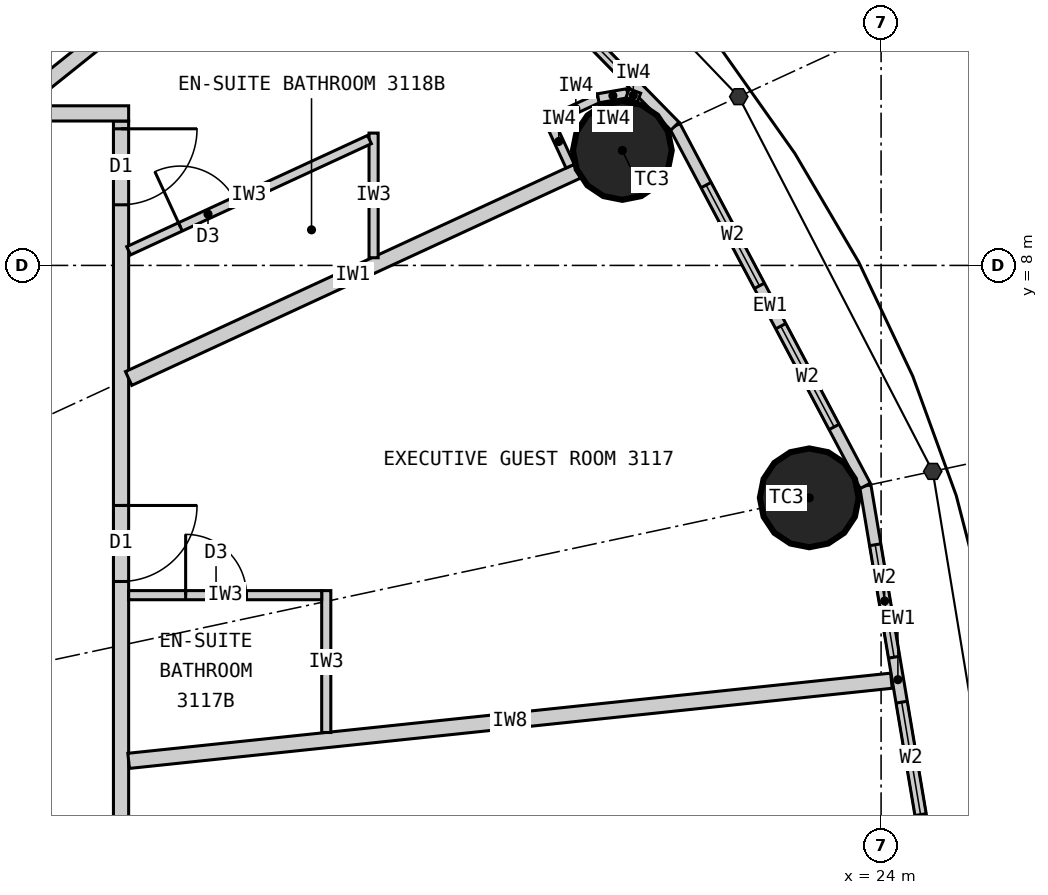
"""IFC4 building model, lengths in metres.
Left out: names, types, materials, properties, quantities, classifications, styles, units other than length and angle.
Written with IfcOpenShell. Run it as: python <this file> out.ifc"""

import sys

from ifc_helpers import new_model, si_unit, direction, frame, frame_2d, origin, origin_2d, place, context, subcontext, project, spatial, rectangle, circle, extrude, element, fill, save


model = new_model("IFC4")
c1 = context("Model", 3, precision=1e-05, world=origin(), true_north=direction((0.0, 1.0)))
c2 = subcontext(c1, "Body", "Model", "MODEL_VIEW")
j1 = project(units=[si_unit("LENGTHUNIT", "METRE"), si_unit("PLANEANGLEUNIT", "RADIAN")], contexts=[c1])
p1 = place(None, origin())
s1 = spatial("IfcSite", under=j1, at=p1, CompositionType="ELEMENT")
p2 = place(p1, origin())
s2 = spatial("IfcBuilding", under=s1, at=p2, CompositionType="ELEMENT")
p3 = place(p2, frame((0.0, 0.0, 122.1)))
s3 = spatial("IfcBuildingStorey", under=s2, at=p3, CompositionType="ELEMENT", Elevation=122.1)
for number, where, z_axis, x_axis in (
    (1, (23.055, 4.942, 0.0), (0.0, 0.0, 1.0), (1.0, 0.0, 0.0)),
    (2, (20.596, 9.513, 0.0), (0.0, 0.0, 1.0), (1.0, 0.0, 0.0)),
):
    element("IfcColumn", number, at=place(p3, frame(where, z_axis=z_axis, x_axis=x_axis)), inside=s3, PredefinedType="COLUMN", context=c2, shape_type="SweptSolid", body=[
        extrude(circle(Radius=0.65, at=origin_2d()), origin(), (0.0, 0.0, 1.0), 3.3),
    ])
p4 = place(p3, frame((24.65, 0.0, 0.0), z_axis=(0.0, 0.0, 1.0), x_axis=(-0.165883894218, 0.986145290329, 0.0)))
e3 = element("IfcWall", 3, at=p4, inside=s3, PredefinedType="ELEMENTEDWALL", context=c2, shape_type="SweptSolid", body=[
    extrude(rectangle(XDim=5.172, YDim=0.15, at=frame_2d((2.586, 0.0))), origin(), (0.0, 0.0, 1.0), 3.12),
])
p5 = place(p4, frame((0.786, 0.0, 0.9)))
e4 = element("IfcOpeningElement", 4, at=p5, cuts=e3, PredefinedType="OPENING", context=c2, shape_type="SweptSolid", body=[
    extrude(rectangle(XDim=1.5, YDim=1.9, at=frame_2d((0.75, 0.95))), frame((0.0, 0.085, 0.0), z_axis=(0.0, -1.0, 0.0), x_axis=(1.0, 0.0, 0.0)), (0.0, 0.0, 1.0), 0.17),
])
p6 = place(p4, frame((2.886, 0.0, 0.9)))
e5 = element("IfcOpeningElement", 5, at=p6, cuts=e3, PredefinedType="OPENING", context=c2, shape_type="SweptSolid", body=[
    extrude(rectangle(XDim=1.5, YDim=1.9, at=frame_2d((0.75, 0.95))), frame((0.0, 0.085, 0.0), z_axis=(0.0, -1.0, 0.0), x_axis=(1.0, 0.0, 0.0)), (0.0, 0.0, 1.0), 0.17),
])
p7 = place(p3, frame((23.792, 5.1, 0.0), z_axis=(0.0, 0.0, 1.0), x_axis=(-0.467814388454, 0.883826735257, 0.0)))
e6 = element("IfcWall", 6, at=p7, inside=s3, PredefinedType="ELEMENTEDWALL", context=c2, shape_type="SweptSolid", body=[
    extrude(rectangle(XDim=5.354, YDim=0.15, at=frame_2d((2.677, 0.0))), origin(), (0.0, 0.0, 1.0), 3.12),
])
p8 = place(p7, frame((0.877, 0.0, 0.9)))
e7 = element("IfcOpeningElement", 7, at=p8, cuts=e6, PredefinedType="OPENING", context=c2, shape_type="SweptSolid", body=[
    extrude(rectangle(XDim=1.5, YDim=1.9, at=frame_2d((0.75, 0.95))), frame((0.0, 0.085, 0.0), z_axis=(0.0, -1.0, 0.0), x_axis=(1.0, 0.0, 0.0)), (0.0, 0.0, 1.0), 0.17),
])
p9 = place(p7, frame((2.977, 0.0, 0.9)))
e8 = element("IfcOpeningElement", 8, at=p9, cuts=e6, PredefinedType="OPENING", context=c2, shape_type="SweptSolid", body=[
    extrude(rectangle(XDim=1.5, YDim=1.9, at=frame_2d((0.75, 0.95))), frame((0.0, 0.085, 0.0), z_axis=(0.0, -1.0, 0.0), x_axis=(1.0, 0.0, 0.0)), (0.0, 0.0, 1.0), 0.17),
])
p10 = place(p3, frame((21.287, 9.832, 0.0), z_axis=(0.0, 0.0, 1.0), x_axis=(-0.700136650834, 0.714008872605, 0.0)))
e9 = element("IfcWall", 9, at=p10, inside=s3, PredefinedType="ELEMENTEDWALL", context=c2, shape_type="SweptSolid", body=[
    extrude(rectangle(XDim=5.649, YDim=0.15, at=frame_2d((2.825, 0.0))), origin(), (0.0, 0.0, 1.0), 3.12),
])
p11 = place(p10, frame((1.025, 0.0, 0.9)))
e10 = element("IfcOpeningElement", 10, at=p11, cuts=e9, PredefinedType="OPENING", context=c2, shape_type="SweptSolid", body=[
    extrude(rectangle(XDim=1.5, YDim=1.9, at=frame_2d((0.75, 0.95))), frame((0.0, 0.085, 0.0), z_axis=(0.0, -1.0, 0.0), x_axis=(1.0, 0.0, 0.0)), (0.0, 0.0, 1.0), 0.17),
])
p12 = place(p10, frame((3.125, 0.0, 0.9)))
e11 = element("IfcOpeningElement", 11, at=p12, cuts=e9, PredefinedType="OPENING", context=c2, shape_type="SweptSolid", body=[
    extrude(rectangle(XDim=1.5, YDim=1.9, at=frame_2d((0.75, 0.95))), frame((0.0, 0.085, 0.0), z_axis=(0.0, -1.0, 0.0), x_axis=(1.0, 0.0, 0.0)), (0.0, 0.0, 1.0), 0.17),
])
p13 = place(p3, frame((14.0, -9.9, 0.0), z_axis=(0.0, 0.0, 1.0), x_axis=(0.0, 1.0, 0.0)))
e12 = element("IfcWall", 12, at=p13, inside=s3, PredefinedType="PARTITIONING", context=c2, shape_type="SweptSolid", body=[
    extrude(rectangle(XDim=19.8, YDim=0.2, at=frame_2d((9.9, 0.0))), origin(), (0.0, 0.0, 1.0), 3.12),
])
p14 = place(p13, frame((2.478, 0.0, 0.0)))
e13 = element("IfcOpeningElement", 13, at=p14, cuts=e12, PredefinedType="OPENING", context=c2, shape_type="SweptSolid", body=[
    extrude(rectangle(XDim=1.0, YDim=2.2, at=frame_2d((0.5, 1.1))), frame((0.0, 0.11, 0.0), z_axis=(0.0, -1.0, 0.0), x_axis=(1.0, 0.0, 0.0)), (0.0, 0.0, 1.0), 0.22),
])
p15 = place(p13, frame((8.838, 0.0, 0.0)))
e14 = element("IfcOpeningElement", 14, at=p15, cuts=e12, PredefinedType="OPENING", context=c2, shape_type="SweptSolid", body=[
    extrude(rectangle(XDim=1.0, YDim=2.2, at=frame_2d((0.5, 1.1))), frame((0.0, 0.11, 0.0), z_axis=(0.0, -1.0, 0.0), x_axis=(1.0, 0.0, 0.0)), (0.0, 0.0, 1.0), 0.22),
])
p16 = place(p13, frame((13.742, 0.0, 0.0)))
e15 = element("IfcOpeningElement", 15, at=p16, cuts=e12, PredefinedType="OPENING", context=c2, shape_type="SweptSolid", body=[
    extrude(rectangle(XDim=1.0, YDim=2.2, at=frame_2d((0.5, 1.1))), frame((0.0, 0.11, 0.0), z_axis=(0.0, -1.0, 0.0), x_axis=(1.0, 0.0, 0.0)), (0.0, 0.0, 1.0), 0.22),
])
p17 = place(p13, frame((18.698, 0.0, 0.0)))
e16 = element("IfcOpeningElement", 16, at=p17, cuts=e12, PredefinedType="OPENING", context=c2, shape_type="SweptSolid", body=[
    extrude(rectangle(XDim=1.0, YDim=2.2, at=frame_2d((0.5, 1.1))), frame((0.0, 0.11, 0.0), z_axis=(0.0, -1.0, 0.0), x_axis=(1.0, 0.0, 0.0)), (0.0, 0.0, 1.0), 0.22),
])
p18 = place(p3, frame((3.283, 10.0, 0.0), z_axis=(0.0, 0.0, 1.0), x_axis=(1.0, 0.0, 0.0)))
e17 = element("IfcWall", 17, at=p18, inside=s3, PredefinedType="PARTITIONING", context=c2, shape_type="SweptSolid", body=[
    extrude(rectangle(XDim=10.817, YDim=0.2, at=frame_2d((5.409, 0.0))), origin(), (0.0, 0.0, 1.0), 3.12),
])
p19 = place(p18, frame((6.482, 0.0, 0.0)))
e18 = element("IfcOpeningElement", 18, at=p19, cuts=e17, PredefinedType="OPENING", context=c2, shape_type="SweptSolid", body=[
    extrude(rectangle(XDim=1.0, YDim=2.2, at=frame_2d((0.5, 1.1))), frame((0.0, 0.11, 0.0), z_axis=(0.0, -1.0, 0.0), x_axis=(1.0, 0.0, 0.0)), (0.0, 0.0, 1.0), 0.22),
])
p20 = place(p3, frame((14.1, 1.482, 0.0), z_axis=(0.0, 0.0, 1.0), x_axis=(0.994523202615, 0.104516024894, 0.0)))
e19 = element("IfcWall", 19, at=p20, inside=s3, PredefinedType="PARTITIONING", context=c2, shape_type="SweptSolid", body=[
    extrude(rectangle(XDim=10.091, YDim=0.2, at=frame_2d((5.045, 0.0))), origin(), (0.0, 0.0, 1.0), 2.47),
])
p21 = place(p3, frame((14.1, 6.512, 0.0), z_axis=(0.0, 0.0, 1.0), x_axis=(0.907833019998, 0.419331858797, 0.0)))
e20 = element("IfcWall", 20, at=p21, inside=s3, PredefinedType="PARTITIONING", context=c2, shape_type="SweptSolid", body=[
    extrude(rectangle(XDim=6.505, YDim=0.2, at=frame_2d((3.252, 0.0))), origin(), (0.0, 0.0, 1.0), 2.27),
])
p22 = place(p3, frame((12.625, 10.1, 0.0), z_axis=(0.0, 0.0, 1.0), x_axis=(0.780863644897, 0.624701503182, 0.0)))
e21 = element("IfcWall", 21, at=p22, inside=s3, PredefinedType="PARTITIONING", context=c2, shape_type="SweptSolid", body=[
    extrude(rectangle(XDim=4.612, YDim=0.2, at=frame_2d((2.306, 0.0))), origin(), (0.0, 0.0, 1.0), 2.37),
])
p23 = place(p3, frame((16.7, 1.855, 0.0), z_axis=(0.0, 0.0, 1.0), x_axis=(0.0, 1.0, 0.0)))
e22 = element("IfcWall", 22, at=p23, inside=s3, PredefinedType="PARTITIONING", context=c2, shape_type="SweptSolid", body=[
    extrude(rectangle(XDim=1.867, YDim=0.12, at=frame_2d((0.933, 0.0))), origin(), (0.0, 0.0, 1.0), 3.12),
])
p24 = place(p3, frame((14.1, 3.662, 0.0), z_axis=(0.0, 0.0, 1.0), x_axis=(1.0, 0.0, 0.0)))
e23 = element("IfcWall", 23, at=p24, inside=s3, PredefinedType="PARTITIONING", context=c2, shape_type="SweptSolid", body=[
    extrude(rectangle(XDim=2.54, YDim=0.12, at=frame_2d((1.27, 0.0))), origin(), (0.0, 0.0, 1.0), 2.37),
])
p25 = place(p24, frame((0.75, 0.0, 0.0)))
e24 = element("IfcOpeningElement", 24, at=p25, cuts=e23, PredefinedType="OPENING", context=c2, shape_type="SweptSolid", body=[
    extrude(rectangle(XDim=0.8, YDim=2.1, at=frame_2d((0.4, 1.05))), frame((0.0, 0.07, 0.0), z_axis=(0.0, -1.0, 0.0), x_axis=(1.0, 0.0, 0.0)), (0.0, 0.0, 1.0), 0.14),
])
p26 = place(p3, frame((17.323, 8.101, 0.0), z_axis=(0.0, 0.0, 1.0), x_axis=(0.0, 1.0, 0.0)))
e25 = element("IfcWall", 25, at=p26, inside=s3, PredefinedType="PARTITIONING", context=c2, shape_type="SweptSolid", body=[
    extrude(rectangle(XDim=1.64, YDim=0.12, at=frame_2d((0.82, 0.0))), origin(), (0.0, 0.0, 1.0), 3.12),
])
p27 = place(p3, frame((14.1, 8.193, 0.0), z_axis=(0.0, 0.0, 1.0), x_axis=(0.907836493557, 0.419324338628, 0.0)))
e26 = element("IfcWall", 26, at=p27, inside=s3, PredefinedType="PARTITIONING", context=c2, shape_type="SweptSolid", body=[
    extrude(rectangle(XDim=3.49, YDim=0.12, at=frame_2d((1.745, 0.0))), origin(), (0.0, 0.0, 1.0), 3.12),
])
p28 = place(p27, frame((0.75, 0.0, 0.0)))
e27 = element("IfcOpeningElement", 27, at=p28, cuts=e26, PredefinedType="OPENING", context=c2, shape_type="SweptSolid", body=[
    extrude(rectangle(XDim=0.8, YDim=2.1, at=frame_2d((0.4, 1.05))), frame((0.0, 0.07, 0.0), z_axis=(0.0, -1.0, 0.0), x_axis=(1.0, 0.0, 0.0)), (0.0, 0.0, 1.0), 0.14),
])
p29 = place(p3, frame((19.909, 9.306, 0.0), z_axis=(0.0, 0.0, 1.0), x_axis=(-0.419296148934, 0.90784951368, 0.0)))
e28 = element("IfcWall", 28, at=p29, inside=s3, PredefinedType="PARTITIONING", context=c2, shape_type="SweptSolid", body=[
    extrude(rectangle(XDim=0.716, YDim=0.12, at=frame_2d((0.358, 0.0))), origin(), (0.0, 0.0, 1.0), 3.12),
])
p30 = place(p3, frame((19.689, 9.926, 0.0), z_axis=(0.0, 0.0, 1.0), x_axis=(0.907893409272, 0.419201094227, 0.0)))
e29 = element("IfcWall", 29, at=p30, inside=s3, PredefinedType="PARTITIONING", context=c2, shape_type="SweptSolid", body=[
    extrude(rectangle(XDim=0.65, YDim=0.12, at=frame_2d((0.325, 0.0))), origin(), (0.0, 0.0, 1.0), 3.12),
])
p31 = place(p3, frame((20.279, 10.199, 0.0), z_axis=(0.0, 0.0, 1.0), x_axis=(0.985380740712, 0.170366651181, 0.0)))
e30 = element("IfcWall", 30, at=p31, inside=s3, PredefinedType="PARTITIONING", context=c2, shape_type="SweptSolid", body=[
    extrude(rectangle(XDim=0.391, YDim=0.12, at=frame_2d((0.196, 0.0))), origin(), (0.0, 0.0, 1.0), 3.12),
])
p32 = place(p3, frame((20.664, 10.265, 0.0), z_axis=(0.0, 0.0, 1.0), x_axis=(0.938058651481, -0.346476501918, 0.0)))
e31 = element("IfcWall", 31, at=p32, inside=s3, PredefinedType="PARTITIONING", context=c2, shape_type="SweptSolid", body=[
    extrude(rectangle(XDim=0.161, YDim=0.12, at=frame_2d((0.081, 0.0))), origin(), (0.0, 0.0, 1.0), 3.12),
])
p33 = place(p5, origin())
e32 = element("IfcWindow", 32, at=p33, inside=s3, PartitioningType="SINGLE_PANEL", PredefinedType="WINDOW", context=c2, shape_type="SweptSolid", body=[
    extrude(rectangle(XDim=1.5, YDim=1.9, at=frame_2d((0.75, 0.95))), frame((0.0, 0.03, 0.0), z_axis=(0.0, -1.0, 0.0), x_axis=(1.0, 0.0, 0.0)), (0.0, 0.0, 1.0), 0.06),
])
fill(e4, e32)
p34 = place(p6, origin())
e33 = element("IfcWindow", 33, at=p34, inside=s3, PartitioningType="SINGLE_PANEL", PredefinedType="WINDOW", context=c2, shape_type="SweptSolid", body=[
    extrude(rectangle(XDim=1.5, YDim=1.9, at=frame_2d((0.75, 0.95))), frame((0.0, 0.03, 0.0), z_axis=(0.0, -1.0, 0.0), x_axis=(1.0, 0.0, 0.0)), (0.0, 0.0, 1.0), 0.06),
])
fill(e5, e33)
p35 = place(p8, origin())
e34 = element("IfcWindow", 34, at=p35, inside=s3, PartitioningType="SINGLE_PANEL", PredefinedType="WINDOW", context=c2, shape_type="SweptSolid", body=[
    extrude(rectangle(XDim=1.5, YDim=1.9, at=frame_2d((0.75, 0.95))), frame((0.0, 0.03, 0.0), z_axis=(0.0, -1.0, 0.0), x_axis=(1.0, 0.0, 0.0)), (0.0, 0.0, 1.0), 0.06),
])
fill(e7, e34)
p36 = place(p9, origin())
e35 = element("IfcWindow", 35, at=p36, inside=s3, PartitioningType="SINGLE_PANEL", PredefinedType="WINDOW", context=c2, shape_type="SweptSolid", body=[
    extrude(rectangle(XDim=1.5, YDim=1.9, at=frame_2d((0.75, 0.95))), frame((0.0, 0.03, 0.0), z_axis=(0.0, -1.0, 0.0), x_axis=(1.0, 0.0, 0.0)), (0.0, 0.0, 1.0), 0.06),
])
fill(e8, e35)
p37 = place(p11, origin())
e36 = element("IfcWindow", 36, at=p37, inside=s3, PartitioningType="SINGLE_PANEL", PredefinedType="WINDOW", context=c2, shape_type="SweptSolid", body=[
    extrude(rectangle(XDim=1.5, YDim=1.9, at=frame_2d((0.75, 0.95))), frame((0.0, 0.03, 0.0), z_axis=(0.0, -1.0, 0.0), x_axis=(1.0, 0.0, 0.0)), (0.0, 0.0, 1.0), 0.06),
])
fill(e10, e36)
p38 = place(p25, origin())
e37 = element("IfcDoor", 37, at=p38, inside=s3, OperationType="SINGLE_SWING_LEFT", PredefinedType="DOOR", context=c2, shape_type="SweptSolid", body=[
    extrude(rectangle(XDim=0.8, YDim=2.1, at=frame_2d((0.4, 1.05))), frame((0.0, 0.025, 0.0), z_axis=(0.0, -1.0, 0.0), x_axis=(1.0, 0.0, 0.0)), (0.0, 0.0, 1.0), 0.05),
])
fill(e24, e37)
p39 = place(p16, origin())
e38 = element("IfcDoor", 38, at=p39, inside=s3, OperationType="SINGLE_SWING_RIGHT", PredefinedType="DOOR", context=c2, shape_type="SweptSolid", body=[
    extrude(rectangle(XDim=1.0, YDim=2.2, at=frame_2d((0.5, 1.1))), frame((0.0, 0.025, 0.0), z_axis=(0.0, -1.0, 0.0), x_axis=(1.0, 0.0, 0.0)), (0.0, 0.0, 1.0), 0.05),
])
fill(e15, e38)
p40 = place(p28, origin())
e39 = element("IfcDoor", 39, at=p40, inside=s3, OperationType="SINGLE_SWING_LEFT", PredefinedType="DOOR", context=c2, shape_type="SweptSolid", body=[
    extrude(rectangle(XDim=0.8, YDim=2.1, at=frame_2d((0.4, 1.05))), frame((0.0, 0.025, 0.0), z_axis=(0.0, -1.0, 0.0), x_axis=(1.0, 0.0, 0.0)), (0.0, 0.0, 1.0), 0.05),
])
fill(e27, e39)
p41 = place(p17, origin())
e40 = element("IfcDoor", 40, at=p41, inside=s3, OperationType="SINGLE_SWING_RIGHT", PredefinedType="DOOR", context=c2, shape_type="SweptSolid", body=[
    extrude(rectangle(XDim=1.0, YDim=2.2, at=frame_2d((0.5, 1.1))), frame((0.0, 0.025, 0.0), z_axis=(0.0, -1.0, 0.0), x_axis=(1.0, 0.0, 0.0)), (0.0, 0.0, 1.0), 0.05),
])
fill(e16, e40)
save(model, sys.argv[1])
